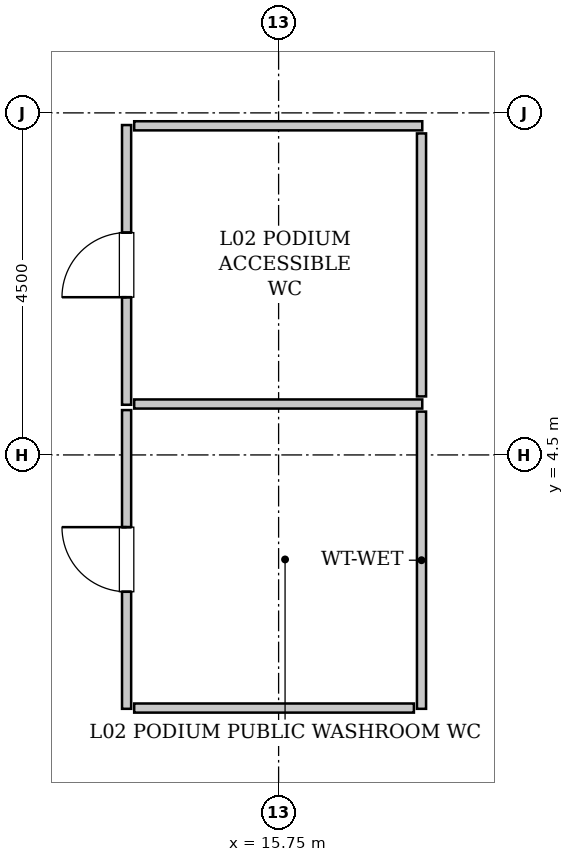
"""IFC4 building model, lengths in metres.
Left out: names, types, materials, properties, quantities, classifications, styles, units other than length and angle.
Written with IfcOpenShell. Run it as: python <this file> out.ifc"""

import sys

from ifc_helpers import new_model, si_unit, direction, frame, frame_2d, origin, place, context, subcontext, project, spatial, rectangle, extrude, source, transform, mapped, element, fill, save


model = new_model("IFC4")
c1 = context("Model", 3, precision=1e-05, world=origin(), true_north=direction((0.0, 1.0)))
c2 = subcontext(c1, "Body", "Model", "MODEL_VIEW")
j1 = project(units=[si_unit("LENGTHUNIT", "METRE"), si_unit("PLANEANGLEUNIT", "RADIAN")], contexts=[c1])
p1 = place(None, origin())
s1 = spatial("IfcSite", under=j1, at=p1, CompositionType="ELEMENT")
p2 = place(p1, origin())
s2 = spatial("IfcBuilding", under=s1, at=p2, CompositionType="ELEMENT")
p3 = place(p2, frame((0.0, 0.0, 11.4)))
s3 = spatial("IfcBuildingStorey", under=s2, at=p3, CompositionType="ELEMENT", Elevation=11.4)
m1 = source(origin(), c2, "Body", "SweptSolid", [
    extrude(rectangle(XDim=3.68, YDim=0.12, at=frame_2d((1.84, 0.0))), origin(), (0.0, 0.0, 1.0), 5.085),
])
p4 = place(p3, frame((13.75, 5.16, 0.0), z_axis=(0.0, 0.0, 1.0), x_axis=(0.0, 1.0, 0.0)))
e1 = element("IfcWall", 1, at=p4, inside=s3, PredefinedType="PLUMBINGWALL", context=c2, shape_type="MappedRepresentation", body=[
    mapped(m1, transform((0.0, 0.0, 0.0), x_axis=(1.0, 0.0, 0.0), y_axis=(0.0, 1.0, 0.0), z_axis=(0.0, 0.0, 1.0), scale=1.0)),
])
p5 = place(p4, frame((1.415, 0.0, 0.0)))
e2 = element("IfcOpeningElement", 2, at=p5, cuts=e1, PredefinedType="OPENING", context=c2, shape_type="SweptSolid", body=[
    extrude(rectangle(XDim=0.85, YDim=2.1, at=frame_2d((0.425, 1.05))), frame((0.0, 0.07, 0.0), z_axis=(0.0, -1.0, 0.0), x_axis=(1.0, 0.0, 0.0)), (0.0, 0.0, 1.0), 0.14),
])
m2 = source(origin(), c2, "Body", "SweptSolid", [
    extrude(rectangle(XDim=3.79, YDim=0.12, at=frame_2d((1.895, 0.0))), origin(), (0.0, 0.0, 1.0), 5.085),
])
p6 = place(p3, frame((13.85, 5.17, 0.0), z_axis=(0.0, 0.0, 1.0), x_axis=(1.0, 0.0, 0.0)))
e3 = element("IfcWall", 3, at=p6, inside=s3, PredefinedType="PLUMBINGWALL", context=c2, shape_type="MappedRepresentation", body=[
    mapped(m2, transform((0.0, 0.0, 0.0), x_axis=(1.0, 0.0, 0.0), y_axis=(0.0, 1.0, 0.0), z_axis=(0.0, 0.0, 1.0), scale=1.0)),
])
m3 = source(origin(), c2, "Body", "SweptSolid", [
    extrude(rectangle(XDim=3.79, YDim=0.12, at=frame_2d((1.895, 0.0))), origin(), (0.0, 0.0, 1.0), 4.075),
])
p7 = place(p3, frame((13.85, 8.83, 0.0), z_axis=(0.0, 0.0, 1.0), x_axis=(1.0, 0.0, 0.0)))
e4 = element("IfcWall", 4, at=p7, inside=s3, PredefinedType="PLUMBINGWALL", context=c2, shape_type="MappedRepresentation", body=[
    mapped(m3, transform((0.0, 0.0, 0.0), x_axis=(1.0, 0.0, 0.0), y_axis=(0.0, 1.0, 0.0), z_axis=(0.0, 0.0, 1.0), scale=1.0)),
])
m4 = source(origin(), c2, "Body", "SweptSolid", [
    extrude(rectangle(XDim=3.46, YDim=0.12, at=frame_2d((1.73, 0.0))), origin(), (0.0, 0.0, 1.0), 4.625),
])
p8 = place(p3, frame((17.63, 5.27, 0.0), z_axis=(0.0, 0.0, 1.0), x_axis=(0.0, 1.0, 0.0)))
e5 = element("IfcWall", 5, at=p8, inside=s3, PredefinedType="PLUMBINGWALL", context=c2, shape_type="MappedRepresentation", body=[
    mapped(m4, transform((0.0, 0.0, 0.0), x_axis=(1.0, 0.0, 0.0), y_axis=(0.0, 1.0, 0.0), z_axis=(0.0, 0.0, 1.0), scale=1.0)),
])
m5 = source(origin(), c2, "Body", "SweptSolid", [
    extrude(rectangle(XDim=3.93, YDim=0.12, at=frame_2d((1.965, 0.0))), origin(), (0.0, 0.0, 1.0), 5.085),
])
p9 = place(p3, frame((13.75, 1.16, 0.0), z_axis=(0.0, 0.0, 1.0), x_axis=(0.0, 1.0, 0.0)))
e6 = element("IfcWall", 6, at=p9, inside=s3, PredefinedType="PLUMBINGWALL", context=c2, shape_type="MappedRepresentation", body=[
    mapped(m5, transform((0.0, 0.0, 0.0), x_axis=(1.0, 0.0, 0.0), y_axis=(0.0, 1.0, 0.0), z_axis=(0.0, 0.0, 1.0), scale=1.0)),
])
p10 = place(p9, frame((1.54, 0.0, 0.0)))
e7 = element("IfcOpeningElement", 7, at=p10, cuts=e6, PredefinedType="OPENING", context=c2, shape_type="SweptSolid", body=[
    extrude(rectangle(XDim=0.85, YDim=2.1, at=frame_2d((0.425, 1.05))), frame((0.0, 0.07, 0.0), z_axis=(0.0, -1.0, 0.0), x_axis=(1.0, 0.0, 0.0)), (0.0, 0.0, 1.0), 0.14),
])
m6 = source(origin(), c2, "Body", "SweptSolid", [
    extrude(rectangle(XDim=3.91, YDim=0.12, at=frame_2d((1.955, 0.0))), origin(), (0.0, 0.0, 1.0), 4.625),
])
p11 = place(p3, frame((17.63, 1.16, 0.0), z_axis=(0.0, 0.0, 1.0), x_axis=(0.0, 1.0, 0.0)))
e8 = element("IfcWall", 8, at=p11, inside=s3, PredefinedType="PLUMBINGWALL", context=c2, shape_type="MappedRepresentation", body=[
    mapped(m6, transform((0.0, 0.0, 0.0), x_axis=(1.0, 0.0, 0.0), y_axis=(0.0, 1.0, 0.0), z_axis=(0.0, 0.0, 1.0), scale=1.0)),
])
m7 = source(origin(), c2, "Body", "SweptSolid", [
    extrude(rectangle(XDim=3.68, YDim=0.12, at=frame_2d((1.84, 0.0))), origin(), (0.0, 0.0, 1.0), 5.085),
])
p12 = place(p3, frame((13.85, 1.17, 0.0), z_axis=(0.0, 0.0, 1.0), x_axis=(1.0, 0.0, 0.0)))
e9 = element("IfcWall", 9, at=p12, inside=s3, PredefinedType="PLUMBINGWALL", context=c2, shape_type="MappedRepresentation", body=[
    mapped(m7, transform((0.0, 0.0, 0.0), x_axis=(1.0, 0.0, 0.0), y_axis=(0.0, 1.0, 0.0), z_axis=(0.0, 0.0, 1.0), scale=1.0)),
])
m8 = source(origin(), c2, "Body", "SweptSolid", [
    extrude(rectangle(XDim=0.85, YDim=2.1, at=frame_2d((0.425, 1.05))), frame((0.0, 0.025, 0.0), z_axis=(0.0, -1.0, 0.0), x_axis=(1.0, 0.0, 0.0)), (0.0, 0.0, 1.0), 0.05),
])
p13 = place(p5, origin())
e10 = element("IfcDoor", 10, at=p13, inside=s3, OperationType="SINGLE_SWING_LEFT", PredefinedType="DOOR", context=c2, shape_type="MappedRepresentation", body=[
    mapped(m8, transform((0.0, 0.0, 0.0), x_axis=(1.0, 0.0, 0.0), y_axis=(0.0, 1.0, 0.0), z_axis=(0.0, 0.0, 1.0), scale=1.0)),
])
fill(e2, e10)
p14 = place(p10, origin())
e11 = element("IfcDoor", 11, at=p14, inside=s3, OperationType="SINGLE_SWING_RIGHT", PredefinedType="DOOR", context=c2, shape_type="MappedRepresentation", body=[
    mapped(m8, transform((0.0, 0.0, 0.0), x_axis=(1.0, 0.0, 0.0), y_axis=(0.0, 1.0, 0.0), z_axis=(0.0, 0.0, 1.0), scale=1.0)),
])
fill(e7, e11)
save(model, sys.argv[1])
